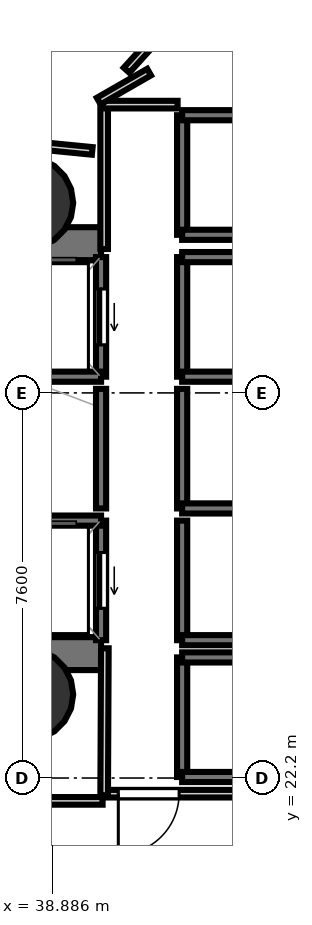
"""IFC4 building model, lengths in metres.
Left out: names, types, materials, properties, quantities, classifications, styles, units other than length and angle.
Written with IfcOpenShell. Run it as: python <this file> out.ifc"""

import sys

from ifc_helpers import new_model, si_unit, direction, frame, frame_2d, origin, origin_2d, place, context, subcontext, project, spatial, rectangle, hollow_circle, extrude, element, fill, save


model = new_model("IFC4")
c1 = context("Model", 3, precision=1e-05, world=origin(), true_north=direction((0.0, 1.0)))
c2 = subcontext(c1, "Body", "Model", "MODEL_VIEW")
j1 = project(units=[si_unit("LENGTHUNIT", "METRE"), si_unit("PLANEANGLEUNIT", "RADIAN")], contexts=[c1])
p1 = place(None, origin())
s1 = spatial("IfcSite", under=j1, at=p1, CompositionType="ELEMENT")
p2 = place(p1, origin())
s2 = spatial("IfcBuilding", under=s1, at=p2, CompositionType="ELEMENT")
p3 = place(p2, frame((0.0, 0.0, -5.6)))
s3 = spatial("IfcBuildingStorey", under=s2, at=p3, CompositionType="ELEMENT", Elevation=-5.6)
p4 = place(p3, frame((29.13, 32.745, 0.0), z_axis=(0.0, 0.0, 1.0), x_axis=(1.0, 0.0, 0.0)))
e1 = element("IfcWall", 1, at=p4, inside=s3, PredefinedType="SHEAR", context=c2, shape_type="SweptSolid", body=[
    extrude(rectangle(XDim=10.72, YDim=0.65, at=frame_2d((5.36, 0.0))), origin(), (0.0, 0.0, 1.0), 5.3),
])
p5 = place(p4, frame((1.095, 0.0, 0.0)))
e2 = element("IfcOpeningElement", 2, at=p5, cuts=e1, PredefinedType="OPENING", context=c2, shape_type="SweptSolid", body=[
    extrude(rectangle(XDim=1.25, YDim=2.15, at=frame_2d((0.625, 1.075))), frame((0.0, 0.335, 0.0), z_axis=(0.0, -1.0, 0.0), x_axis=(1.0, 0.0, 0.0)), (0.0, 0.0, 1.0), 0.67),
])
p6 = place(p3, frame((29.13, 24.655, 0.0), z_axis=(0.0, 0.0, 1.0), x_axis=(1.0, 0.0, 0.0)))
e3 = element("IfcWall", 3, at=p6, inside=s3, PredefinedType="SHEAR", context=c2, shape_type="SweptSolid", body=[
    extrude(rectangle(XDim=10.72, YDim=0.65, at=frame_2d((5.36, 0.0))), origin(), (0.0, 0.0, 1.0), 5.3),
])
p7 = place(p6, frame((0.895, 0.0, 0.0)))
e4 = element("IfcOpeningElement", 4, at=p7, cuts=e3, PredefinedType="OPENING", context=c2, shape_type="SweptSolid", body=[
    extrude(rectangle(XDim=1.25, YDim=2.15, at=frame_2d((0.625, 1.075))), frame((0.0, 0.335, 0.0), z_axis=(0.0, -1.0, 0.0), x_axis=(1.0, 0.0, 0.0)), (0.0, 0.0, 1.0), 0.67),
])
for number, where, z_axis, x_axis in (
    (5, (38.4, 33.55, 0.0), (0.0, 0.0, 1.0), (1.0, 0.0, 0.0)),
    (6, (38.4, 23.85, 0.0), (0.0, 0.0, 1.0), (1.0, 0.0, 0.0)),
):
    element("IfcColumn", number, at=place(p3, frame(where, z_axis=z_axis, x_axis=x_axis)), inside=s3, PredefinedType="COLUMN", context=c2, shape_type="SweptSolid", body=[
        extrude(hollow_circle(Radius=0.9, WallThickness=0.045, at=origin_2d()), origin(), (0.0, 0.0, 1.0), 5.6),
    ])
p8 = place(p3, frame((39.85, 30.12, 0.0), z_axis=(0.0, 0.0, 1.0), x_axis=(0.0, 1.0, 0.0)))
e7 = element("IfcWall", 7, at=p8, inside=s3, PredefinedType="SOLIDWALL", context=c2, shape_type="SweptSolid", body=[
    extrude(rectangle(XDim=2.36, YDim=0.2, at=frame_2d((1.18, 0.0))), origin(), (0.0, 0.0, 1.0), 5.3),
])
p9 = place(p8, frame((0.63, 0.0, 0.0)))
e8 = element("IfcOpeningElement", 8, at=p9, cuts=e7, PredefinedType="OPENING", context=c2, shape_type="SweptSolid", body=[
    extrude(rectangle(XDim=1.1, YDim=2.15, at=frame_2d((0.55, 1.075))), frame((0.0, 0.11, 0.0), z_axis=(0.0, -1.0, 0.0), x_axis=(1.0, 0.0, 0.0)), (0.0, 0.0, 1.0), 0.22),
])
p10 = place(p3, frame((37.75, 30.12, 0.0), z_axis=(0.0, 0.0, 1.0), x_axis=(1.0, 0.0, 0.0)))
e9 = element("IfcWall", 9, at=p10, inside=s3, PredefinedType="SOLIDWALL", context=c2, shape_type="SweptSolid", body=[
    extrude(rectangle(XDim=2.1, YDim=0.2, at=frame_2d((1.05, 0.0))), origin(), (0.0, 0.0, 1.0), 5.3),
])
p11 = place(p3, frame((39.85, 24.92, 0.0), z_axis=(0.0, 0.0, 1.0), x_axis=(0.0, 1.0, 0.0)))
e10 = element("IfcWall", 10, at=p11, inside=s3, PredefinedType="SOLIDWALL", context=c2, shape_type="SweptSolid", body=[
    extrude(rectangle(XDim=2.36, YDim=0.2, at=frame_2d((1.18, 0.0))), origin(), (0.0, 0.0, 1.0), 5.3),
])
p12 = place(p11, frame((0.63, 0.0, 0.0)))
e11 = element("IfcOpeningElement", 11, at=p12, cuts=e10, PredefinedType="OPENING", context=c2, shape_type="SweptSolid", body=[
    extrude(rectangle(XDim=1.1, YDim=2.15, at=frame_2d((0.55, 1.075))), frame((0.0, 0.11, 0.0), z_axis=(0.0, -1.0, 0.0), x_axis=(1.0, 0.0, 0.0)), (0.0, 0.0, 1.0), 0.22),
])
p13 = place(p3, frame((37.75, 27.28, 0.0), z_axis=(0.0, 0.0, 1.0), x_axis=(1.0, 0.0, 0.0)))
e12 = element("IfcWall", 12, at=p13, inside=s3, PredefinedType="SOLIDWALL", context=c2, shape_type="SweptSolid", body=[
    extrude(rectangle(XDim=2.1, YDim=0.2, at=frame_2d((1.05, 0.0))), origin(), (0.0, 0.0, 1.0), 5.3),
])
p14 = place(p3, frame((41.45, 30.12, 0.0), z_axis=(0.0, 0.0, 1.0), x_axis=(0.0, 1.0, 0.0)))
e13 = element("IfcWall", 13, at=p14, inside=s3, PredefinedType="SOLIDWALL", context=c2, shape_type="SweptSolid", body=[
    extrude(rectangle(XDim=2.36, YDim=0.2, at=frame_2d((1.18, 0.0))), origin(), (0.0, 0.0, 1.0), 5.3),
])
for number, where, z_axis, x_axis in (
    (14, (41.45, 32.48, 0.0), (0.0, 0.0, 1.0), (1.0, 0.0, 0.0)),
    (15, (41.45, 30.12, 0.0), (0.0, 0.0, 1.0), (1.0, 0.0, 0.0)),
):
    element("IfcWall", number, at=place(p3, frame(where, z_axis=z_axis, x_axis=x_axis)), inside=s3, PredefinedType="SOLIDWALL", context=c2, shape_type="SweptSolid", body=[
        extrude(rectangle(XDim=2.1, YDim=0.2, at=frame_2d((1.05, 0.0))), origin(), (0.0, 0.0, 1.0), 5.3),
    ])
p15 = place(p3, frame((41.45, 27.52, 0.0), z_axis=(0.0, 0.0, 1.0), x_axis=(0.0, 1.0, 0.0)))
e16 = element("IfcWall", 16, at=p15, inside=s3, PredefinedType="SOLIDWALL", context=c2, shape_type="SweptSolid", body=[
    extrude(rectangle(XDim=2.36, YDim=0.2, at=frame_2d((1.18, 0.0))), origin(), (0.0, 0.0, 1.0), 5.3),
])
p16 = place(p3, frame((41.45, 27.52, 0.0), z_axis=(0.0, 0.0, 1.0), x_axis=(1.0, 0.0, 0.0)))
e17 = element("IfcWall", 17, at=p16, inside=s3, PredefinedType="SOLIDWALL", context=c2, shape_type="SweptSolid", body=[
    extrude(rectangle(XDim=2.1, YDim=0.2, at=frame_2d((1.05, 0.0))), origin(), (0.0, 0.0, 1.0), 5.3),
])
p17 = place(p3, frame((41.45, 24.92, 0.0), z_axis=(0.0, 0.0, 1.0), x_axis=(0.0, 1.0, 0.0)))
e18 = element("IfcWall", 18, at=p17, inside=s3, PredefinedType="SOLIDWALL", context=c2, shape_type="SweptSolid", body=[
    extrude(rectangle(XDim=2.36, YDim=0.2, at=frame_2d((1.18, 0.0))), origin(), (0.0, 0.0, 1.0), 5.3),
])
p18 = place(p3, frame((41.45, 24.92, 0.0), z_axis=(0.0, 0.0, 1.0), x_axis=(1.0, 0.0, 0.0)))
e19 = element("IfcWall", 19, at=p18, inside=s3, PredefinedType="SOLIDWALL", context=c2, shape_type="SweptSolid", body=[
    extrude(rectangle(XDim=2.1, YDim=0.2, at=frame_2d((1.05, 0.0))), origin(), (0.0, 0.0, 1.0), 5.3),
])
p19 = place(p3, frame((39.85, 27.52, 0.0), z_axis=(0.0, 0.0, 1.0), x_axis=(0.0, 1.0, 0.0)))
e20 = element("IfcWall", 20, at=p19, inside=s3, PredefinedType="SOLIDWALL", context=c2, shape_type="SweptSolid", body=[
    extrude(rectangle(XDim=2.36, YDim=0.2, at=frame_2d((1.18, 0.0))), origin(), (0.0, 0.0, 1.0), 5.3),
])
p20 = place(p3, frame((41.45, 22.22, 0.0), z_axis=(0.0, 0.0, 1.0), x_axis=(0.0, 1.0, 0.0)))
e21 = element("IfcWall", 21, at=p20, inside=s3, PredefinedType="SOLIDWALL", context=c2, shape_type="SweptSolid", body=[
    extrude(rectangle(XDim=2.36, YDim=0.2, at=frame_2d((1.18, 0.0))), origin(), (0.0, 0.0, 1.0), 5.3),
])
for number, where, z_axis, x_axis in (
    (22, (41.45, 24.58, 0.0), (0.0, 0.0, 1.0), (1.0, 0.0, 0.0)),
    (23, (41.45, 22.22, 0.0), (0.0, 0.0, 1.0), (1.0, 0.0, 0.0)),
):
    element("IfcWall", number, at=place(p3, frame(where, z_axis=z_axis, x_axis=x_axis)), inside=s3, PredefinedType="SOLIDWALL", context=c2, shape_type="SweptSolid", body=[
        extrude(rectangle(XDim=2.1, YDim=0.2, at=frame_2d((1.05, 0.0))), origin(), (0.0, 0.0, 1.0), 5.3),
    ])
p21 = place(p3, frame((41.45, 32.92, 0.0), z_axis=(0.0, 0.0, 1.0), x_axis=(0.0, 1.0, 0.0)))
e24 = element("IfcWall", 24, at=p21, inside=s3, PredefinedType="SOLIDWALL", context=c2, shape_type="SweptSolid", body=[
    extrude(rectangle(XDim=2.36, YDim=0.2, at=frame_2d((1.18, 0.0))), origin(), (0.0, 0.0, 1.0), 5.3),
])
for number, where, z_axis, x_axis in (
    (25, (41.45, 35.28, 0.0), (0.0, 0.0, 1.0), (1.0, 0.0, 0.0)),
    (26, (41.45, 32.92, 0.0), (0.0, 0.0, 1.0), (1.0, 0.0, 0.0)),
):
    element("IfcWall", number, at=place(p3, frame(where, z_axis=z_axis, x_axis=x_axis)), inside=s3, PredefinedType="SOLIDWALL", context=c2, shape_type="SweptSolid", body=[
        extrude(rectangle(XDim=2.1, YDim=0.2, at=frame_2d((1.05, 0.0))), origin(), (0.0, 0.0, 1.0), 5.3),
    ])
p22 = place(p3, frame((39.911, 32.64, 0.0), z_axis=(0.0, 0.0, 1.0), x_axis=(0.0, 1.0, 0.0)))
e27 = element("IfcWall", 27, at=p22, inside=s3, PredefinedType="PARTITIONING", context=c2, shape_type="SweptSolid", body=[
    extrude(rectangle(XDim=2.88, YDim=0.15, at=frame_2d((1.44, 0.0))), origin(), (0.0, 0.0, 1.0), 4.62),
])
p23 = place(p3, frame((39.88, 35.489, 0.0), z_axis=(0.0, 0.0, 1.0), x_axis=(1.0, 0.0, 0.0)))
e28 = element("IfcWall", 28, at=p23, inside=s3, PredefinedType="PARTITIONING", context=c2, shape_type="SweptSolid", body=[
    extrude(rectangle(XDim=1.48, YDim=0.15, at=frame_2d((0.74, 0.0))), origin(), (0.0, 0.0, 1.0), 4.62),
])
p24 = place(p3, frame((43.1, 21.891, 0.0), z_axis=(0.0, 0.0, 1.0), x_axis=(-1.0, 0.0, 0.0)))
e29 = element("IfcWall", 29, at=p24, inside=s3, PredefinedType="PARTITIONING", context=c2, shape_type="SweptSolid", body=[
    extrude(rectangle(XDim=3.22, YDim=0.15, at=frame_2d((1.61, 0.0))), origin(), (0.0, 0.0, 1.0), 4.62),
])
p25 = place(p24, frame((1.71, 0.0, 0.0)))
e30 = element("IfcOpeningElement", 30, at=p25, cuts=e29, PredefinedType="OPENING", context=c2, shape_type="SweptSolid", body=[
    extrude(rectangle(XDim=1.2, YDim=2.15, at=frame_2d((0.6, 1.075))), frame((0.0, 0.085, 0.0), z_axis=(0.0, -1.0, 0.0), x_axis=(1.0, 0.0, 0.0)), (0.0, 0.0, 1.0), 0.17),
])
p26 = place(p3, frame((39.911, 21.86, 0.0), z_axis=(0.0, 0.0, 1.0), x_axis=(0.00479752075, 0.999988491831, 0.0)))
e31 = element("IfcWall", 31, at=p26, inside=s3, PredefinedType="PARTITIONING", context=c2, shape_type="SweptSolid", body=[
    extrude(rectangle(XDim=2.901, YDim=0.15, at=frame_2d((1.45, 0.0))), origin(), (0.0, 0.0, 1.0), 4.478),
])
p27 = place(p3, frame((41.167, 37.065, 0.0), z_axis=(0.0, 0.0, 1.0), x_axis=(-0.671477917818, -0.741024564966, 0.0)))
e32 = element("IfcWall", 32, at=p27, inside=s3, PredefinedType="PARTITIONING", context=c2, shape_type="SweptSolid", body=[
    extrude(rectangle(XDim=1.211, YDim=0.15, at=frame_2d((0.605, 0.0))), origin(), (0.0, 0.0, 1.0), 4.62),
])
p28 = place(p3, frame((40.798, 36.131, 0.0), z_axis=(0.0, 0.0, 1.0), x_axis=(-0.866890199367, -0.498499129629, 0.0)))
e33 = element("IfcWall", 33, at=p28, inside=s3, PredefinedType="PARTITIONING", context=c2, shape_type="SweptSolid", body=[
    extrude(rectangle(XDim=1.146, YDim=0.15, at=frame_2d((0.573, 0.0))), origin(), (0.0, 0.0, 1.0), 4.62),
])
p29 = place(p3, frame((39.676, 34.575, 0.0), z_axis=(0.0, 0.0, 1.0), x_axis=(-0.995186799139, 0.097996095944, 0.0)))
e34 = element("IfcWall", 34, at=p29, inside=s3, PredefinedType="PARTITIONING", context=c2, shape_type="SweptSolid", body=[
    extrude(rectangle(XDim=1.507, YDim=0.15, at=frame_2d((0.754, 0.0))), origin(), (0.0, 0.0, 1.0), 4.62),
])
p30 = place(p3, frame((33.45, 21.749, 0.0), z_axis=(0.0, 0.0, 1.0), x_axis=(1.0, 0.0, 0.0)))
e35 = element("IfcWall", 35, at=p30, inside=s3, PredefinedType="PARTITIONING", context=c2, shape_type="SweptSolid", body=[
    extrude(rectangle(XDim=6.43, YDim=0.15, at=frame_2d((3.215, 0.0))), origin(), (0.0, 0.0, 1.0), 4.62),
])
p31 = place(p9, origin())
e36 = element("IfcDoor", 36, at=p31, inside=s3, OperationType="SLIDING_TO_LEFT", PredefinedType="DOOR", context=c2, shape_type="SweptSolid", body=[
    extrude(rectangle(XDim=1.1, YDim=2.15, at=frame_2d((0.55, 1.075))), frame((0.0, 0.025, 0.0), z_axis=(0.0, -1.0, 0.0), x_axis=(1.0, 0.0, 0.0)), (0.0, 0.0, 1.0), 0.05),
])
fill(e8, e36)
p32 = place(p12, origin())
e37 = element("IfcDoor", 37, at=p32, inside=s3, OperationType="SLIDING_TO_LEFT", PredefinedType="DOOR", context=c2, shape_type="SweptSolid", body=[
    extrude(rectangle(XDim=1.1, YDim=2.15, at=frame_2d((0.55, 1.075))), frame((0.0, 0.025, 0.0), z_axis=(0.0, -1.0, 0.0), x_axis=(1.0, 0.0, 0.0)), (0.0, 0.0, 1.0), 0.05),
])
fill(e11, e37)
p33 = place(p25, origin())
e38 = element("IfcDoor", 38, at=p33, inside=s3, OperationType="SINGLE_SWING_RIGHT", PredefinedType="DOOR", context=c2, shape_type="SweptSolid", body=[
    extrude(rectangle(XDim=1.2, YDim=2.15, at=frame_2d((0.6, 1.075))), frame((0.0, 0.025, 0.0), z_axis=(0.0, -1.0, 0.0), x_axis=(1.0, 0.0, 0.0)), (0.0, 0.0, 1.0), 0.05),
])
fill(e30, e38)
save(model, sys.argv[1])
